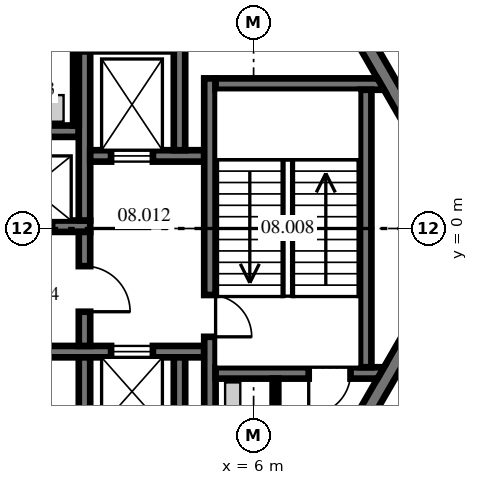
"""IFC4 building model, lengths in metres.
Left out: names, types, materials, properties, quantities, classifications, styles, units other than length and angle.
Written with IfcOpenShell. Run it as: python <this file> out.ifc"""

import sys

from ifc_helpers import new_model, si_unit, direction, frame, frame_2d, origin, place, context, subcontext, project, spatial, polyline, rectangle, outline, extrude, source, transform, mapped, element, fill, save


model = new_model("IFC4")
c1 = context("Model", 3, precision=1e-05, world=origin(), true_north=direction((0.0, 1.0)))
c2 = subcontext(c1, "Body", "Model", "MODEL_VIEW")
j1 = project(units=[si_unit("LENGTHUNIT", "METRE"), si_unit("PLANEANGLEUNIT", "RADIAN")], contexts=[c1])
p1 = place(None, origin())
s1 = spatial("IfcSite", under=j1, at=p1, CompositionType="ELEMENT")
p2 = place(p1, origin())
s2 = spatial("IfcBuilding", under=s1, at=p2, CompositionType="ELEMENT")
p3 = place(p2, frame((0.0, 0.0, 37.5)))
s3 = spatial("IfcBuildingStorey", under=s2, at=p3, CompositionType="ELEMENT", Elevation=37.5)
m1 = source(origin(), c2, "Body", "SweptSolid", [
    extrude(outline(polyline([(-0.115, -0.2), (11.885, -0.2), (11.654, 0.2), (0.115, 0.2), (-0.115, -0.2)])), origin(), (0.0, 0.0, 1.0), 4.1),
])
p4 = place(p3, frame((11.769, 0.0, 0.0), z_axis=(0.0, 0.0, 1.0), x_axis=(-0.499996592174, 0.866027371285, 0.0)))
e1 = element("IfcWall", 1, at=p4, inside=s3, PredefinedType="SHEAR", context=c2, shape_type="MappedRepresentation", body=[
    mapped(m1, transform((0.0, 0.0, 0.0), scale=1.0)),
])
p5 = place(p4, frame((5.75, 0.0, 0.0)))
e2 = element("IfcOpeningElement", 2, at=p5, cuts=e1, PredefinedType="OPENING", context=c2, shape_type="SweptSolid", body=[
    extrude(rectangle(XDim=1.2, YDim=2.1, at=frame_2d((0.6, 1.05))), frame((0.0, 0.21, 0.0), z_axis=(0.0, -1.0, 0.0), x_axis=(1.0, 0.0, 0.0)), (0.0, 0.0, 1.0), 0.42),
])
p6 = place(p3, frame((5.885, -10.192, 0.0), z_axis=(0.0, 0.0, 1.0), x_axis=(0.499996592174, 0.866027371285, 0.0)))
e3 = element("IfcWall", 3, at=p6, inside=s3, PredefinedType="SHEAR", context=c2, shape_type="MappedRepresentation", body=[
    mapped(m1, transform((0.0, 0.0, 0.0), scale=1.0)),
])
p7 = place(p6, frame((3.665, 0.0, 0.0)))
e4 = element("IfcOpeningElement", 4, at=p7, cuts=e3, PredefinedType="OPENING", context=c2, shape_type="SweptSolid", body=[
    extrude(rectangle(XDim=1.2, YDim=2.1, at=frame_2d((0.6, 1.05))), frame((0.0, 0.21, 0.0), z_axis=(0.0, -1.0, 0.0), x_axis=(1.0, 0.0, 0.0)), (0.0, 0.0, 1.0), 0.42),
])
m2 = source(origin(), c2, "Body", "SweptSolid", [
    extrude(rectangle(XDim=11.5, YDim=0.3, at=frame_2d((5.75, 0.0))), origin(), (0.0, 0.0, 1.0), 4.1),
])
p8 = place(p3, frame((-9.8, 0.06, 0.0), z_axis=(0.0, 0.0, 1.0), x_axis=(1.0, 0.0, 0.0)))
e5 = element("IfcWall", 5, at=p8, inside=s3, PredefinedType="SHEAR", context=c2, shape_type="MappedRepresentation", body=[
    mapped(m2, transform((0.0, 0.0, 0.0), scale=1.0)),
])
p9 = place(p8, frame((1.0, 0.0, 0.0)))
e6 = element("IfcOpeningElement", 6, at=p9, cuts=e5, PredefinedType="OPENING", context=c2, shape_type="SweptSolid", body=[
    extrude(rectangle(XDim=1.1, YDim=2.1, at=frame_2d((0.55, 1.05))), frame((0.0, 0.16, 0.0), z_axis=(0.0, -1.0, 0.0), x_axis=(1.0, 0.0, 0.0)), (0.0, 0.0, 1.0), 0.32),
])
p10 = place(p8, frame((3.8, 0.0, 0.0)))
e7 = element("IfcOpeningElement", 7, at=p10, cuts=e5, PredefinedType="OPENING", context=c2, shape_type="SweptSolid", body=[
    extrude(rectangle(XDim=1.1, YDim=2.1, at=frame_2d((0.55, 1.05))), frame((0.0, 0.16, 0.0), z_axis=(0.0, -1.0, 0.0), x_axis=(1.0, 0.0, 0.0)), (0.0, 0.0, 1.0), 0.32),
])
p11 = place(p8, frame((6.6, 0.0, 0.0)))
e8 = element("IfcOpeningElement", 8, at=p11, cuts=e5, PredefinedType="OPENING", context=c2, shape_type="SweptSolid", body=[
    extrude(rectangle(XDim=1.1, YDim=2.1, at=frame_2d((0.55, 1.05))), frame((0.0, 0.16, 0.0), z_axis=(0.0, -1.0, 0.0), x_axis=(1.0, 0.0, 0.0)), (0.0, 0.0, 1.0), 0.32),
])
p12 = place(p8, frame((9.4, 0.0, 0.0)))
e9 = element("IfcOpeningElement", 9, at=p12, cuts=e5, PredefinedType="OPENING", context=c2, shape_type="SweptSolid", body=[
    extrude(rectangle(XDim=1.1, YDim=2.1, at=frame_2d((0.55, 1.05))), frame((0.0, 0.16, 0.0), z_axis=(0.0, -1.0, 0.0), x_axis=(1.0, 0.0, 0.0)), (0.0, 0.0, 1.0), 0.32),
])
m3 = source(origin(), c2, "Body", "SweptSolid", [
    extrude(outline(polyline([(11.2, -0.15), (-0.349, -0.15), (-0.176, 0.15), (11.2, 0.15), (11.2, -0.15)])), origin(), (0.0, 0.0, 1.0), 4.1),
])
p13 = place(p3, frame((-9.8, 2.56, 0.0), z_axis=(0.0, 0.0, 1.0), x_axis=(1.0, 0.0, 0.0)))
e10 = element("IfcWall", 10, at=p13, inside=s3, PredefinedType="SHEAR", context=c2, shape_type="MappedRepresentation", body=[
    mapped(m3, transform((0.0, 0.0, 0.0), scale=1.0)),
])
m4 = source(origin(), c2, "Body", "SweptSolid", [
    extrude(rectangle(XDim=4.45, YDim=0.3, at=frame_2d((2.225, 0.0))), origin(), (0.0, 0.0, 1.0), 4.1),
])
p14 = place(p3, frame((1.55, 0.21, 0.0), z_axis=(0.0, 0.0, 1.0), x_axis=(0.0, 1.0, 0.0)))
e11 = element("IfcWall", 11, at=p14, inside=s3, PredefinedType="SHEAR", context=c2, shape_type="MappedRepresentation", body=[
    mapped(m4, transform((0.0, 0.0, 0.0), scale=1.0)),
])
m5 = source(origin(), c2, "Body", "SweptSolid", [
    extrude(rectangle(XDim=3.0, YDim=0.3, at=frame_2d((1.5, 0.0))), origin(), (0.0, 0.0, 1.0), 4.1),
])
p15 = place(p3, frame((1.7, 1.91, 0.0), z_axis=(0.0, 0.0, 1.0), x_axis=(1.0, 0.0, 0.0)))
e12 = element("IfcWall", 12, at=p15, inside=s3, PredefinedType="SHEAR", context=c2, shape_type="MappedRepresentation", body=[
    mapped(m5, transform((0.0, 0.0, 0.0), scale=1.0)),
])
p16 = place(p15, frame((0.55, 0.0, 0.0)))
e13 = element("IfcOpeningElement", 13, at=p16, cuts=e12, PredefinedType="OPENING", context=c2, shape_type="SweptSolid", body=[
    extrude(rectangle(XDim=1.1, YDim=2.1, at=frame_2d((0.55, 1.05))), frame((0.0, 0.16, 0.0), z_axis=(0.0, -1.0, 0.0), x_axis=(1.0, 0.0, 0.0)), (0.0, 0.0, 1.0), 0.32),
])
m6 = source(origin(), c2, "Body", "SweptSolid", [
    extrude(rectangle(XDim=2.9, YDim=0.3, at=frame_2d((1.45, 0.0))), origin(), (0.0, 0.0, 1.0), 4.1),
])
p17 = place(p3, frame((4.05, 2.06, 0.0), z_axis=(0.0, 0.0, 1.0), x_axis=(0.0, 1.0, 0.0)))
e14 = element("IfcWall", 14, at=p17, inside=s3, PredefinedType="SHEAR", context=c2, shape_type="MappedRepresentation", body=[
    mapped(m6, transform((0.0, 0.0, 0.0), scale=1.0)),
])
m7 = source(origin(), c2, "Body", "SweptSolid", [
    extrude(rectangle(XDim=12.8, YDim=0.3, at=frame_2d((6.4, 0.0))), origin(), (0.0, 0.0, 1.0), 4.1),
])
p18 = place(p3, frame((-8.1, -3.24, 0.0), z_axis=(0.0, 0.0, 1.0), x_axis=(1.0, 0.0, 0.0)))
e15 = element("IfcWall", 15, at=p18, inside=s3, PredefinedType="SHEAR", context=c2, shape_type="MappedRepresentation", body=[
    mapped(m7, transform((0.0, 0.0, 0.0), scale=1.0)),
])
p19 = place(p18, frame((0.913, 0.0, 0.0)))
e16 = element("IfcOpeningElement", 16, at=p19, cuts=e15, PredefinedType="OPENING", context=c2, shape_type="SweptSolid", body=[
    extrude(rectangle(XDim=0.9, YDim=2.1, at=frame_2d((0.45, 1.05))), frame((0.0, 0.16, 0.0), z_axis=(0.0, -1.0, 0.0), x_axis=(1.0, 0.0, 0.0)), (0.0, 0.0, 1.0), 0.32),
])
p20 = place(p18, frame((3.05, 0.0, 0.0)))
e17 = element("IfcOpeningElement", 17, at=p20, cuts=e15, PredefinedType="OPENING", context=c2, shape_type="SweptSolid", body=[
    extrude(rectangle(XDim=0.9, YDim=2.1, at=frame_2d((0.45, 1.05))), frame((0.0, 0.16, 0.0), z_axis=(0.0, -1.0, 0.0), x_axis=(1.0, 0.0, 0.0)), (0.0, 0.0, 1.0), 0.32),
])
p21 = place(p18, frame((6.587, 0.0, 0.0)))
e18 = element("IfcOpeningElement", 18, at=p21, cuts=e15, PredefinedType="OPENING", context=c2, shape_type="SweptSolid", body=[
    extrude(rectangle(XDim=0.9, YDim=2.1, at=frame_2d((0.45, 1.05))), frame((0.0, 0.16, 0.0), z_axis=(0.0, -1.0, 0.0), x_axis=(1.0, 0.0, 0.0)), (0.0, 0.0, 1.0), 0.32),
])
p22 = place(p18, frame((10.35, 0.0, 0.0)))
e19 = element("IfcOpeningElement", 19, at=p22, cuts=e15, PredefinedType="OPENING", context=c2, shape_type="SweptSolid", body=[
    extrude(rectangle(XDim=1.1, YDim=2.1, at=frame_2d((0.55, 1.05))), frame((0.0, 0.16, 0.0), z_axis=(0.0, -1.0, 0.0), x_axis=(1.0, 0.0, 0.0)), (0.0, 0.0, 1.0), 0.32),
])
m8 = source(origin(), c2, "Body", "SweptSolid", [
    extrude(rectangle(XDim=2.2, YDim=0.3, at=frame_2d((1.1, 0.0))), origin(), (0.0, 0.0, 1.0), 4.1),
])
p23 = place(p3, frame((1.55, -5.59, 0.0), z_axis=(0.0, 0.0, 1.0), x_axis=(0.0, 1.0, 0.0)))
e20 = element("IfcWall", 20, at=p23, inside=s3, PredefinedType="SHEAR", context=c2, shape_type="MappedRepresentation", body=[
    mapped(m8, transform((0.0, 0.0, 0.0), scale=1.0)),
])
m9 = source(origin(), c2, "Body", "SweptSolid", [
    extrude(rectangle(XDim=2.5, YDim=0.3, at=frame_2d((1.25, 0.0))), origin(), (0.0, 0.0, 1.0), 4.1),
])
p24 = place(p3, frame((4.05, -5.89, 0.0), z_axis=(0.0, 0.0, 1.0), x_axis=(0.0, 1.0, 0.0)))
e21 = element("IfcWall", 21, at=p24, inside=s3, PredefinedType="SHEAR", context=c2, shape_type="MappedRepresentation", body=[
    mapped(m9, transform((0.0, 0.0, 0.0), scale=1.0)),
])
p25 = place(p3, frame((1.55, -3.09, 0.0), z_axis=(0.0, 0.0, 1.0), x_axis=(0.0, 1.0, 0.0)))
e22 = element("IfcWall", 22, at=p25, inside=s3, PredefinedType="SHEAR", context=c2, shape_type="MappedRepresentation", body=[
    mapped(m5, transform((0.0, 0.0, 0.0), scale=1.0)),
])
p26 = place(p25, frame((0.9, 0.0, 0.0)))
e23 = element("IfcOpeningElement", 23, at=p26, cuts=e22, PredefinedType="OPENING", context=c2, shape_type="SweptSolid", body=[
    extrude(rectangle(XDim=1.2, YDim=2.1, at=frame_2d((0.6, 1.05))), frame((0.0, 0.16, 0.0), z_axis=(0.0, -1.0, 0.0), x_axis=(1.0, 0.0, 0.0)), (0.0, 0.0, 1.0), 0.32),
])
m10 = source(origin(), c2, "Body", "SweptSolid", [
    extrude(outline(polyline([(-0.15, -0.15), (9.99, -0.15), (9.99, 0.15), (0.15, 0.15), (-0.15, -0.15)])), origin(), (0.0, 0.0, 1.0), 4.1),
])
p27 = place(p3, frame((4.85, -6.04, 0.0), z_axis=(0.0, 0.0, 1.0), x_axis=(0.0, 1.0, 0.0)))
e24 = element("IfcWall", 24, at=p27, inside=s3, PredefinedType="SHEAR", context=c2, shape_type="MappedRepresentation", body=[
    mapped(m10, transform((0.0, 0.0, 0.0), scale=1.0)),
])
p28 = place(p27, frame((3.19, 0.0, 0.0)))
e25 = element("IfcOpeningElement", 25, at=p28, cuts=e24, PredefinedType="OPENING", context=c2, shape_type="SweptSolid", body=[
    extrude(rectangle(XDim=1.1, YDim=2.1, at=frame_2d((0.55, 1.05))), frame((0.0, 0.16, 0.0), z_axis=(0.0, -1.0, 0.0), x_axis=(1.0, 0.0, 0.0)), (0.0, 0.0, 1.0), 0.32),
])
m11 = source(origin(), c2, "Body", "SweptSolid", [
    extrude(outline(polyline([(0.0, -0.15), (0.0, 0.15), (4.26, 0.15), (4.433, -0.15), (0.0, -0.15)])), origin(), (0.0, 0.0, 1.0), 4.1),
])
p29 = place(p3, frame((5.0, 3.8, 0.0), z_axis=(0.0, 0.0, 1.0), x_axis=(1.0, 0.0, 0.0)))
e26 = element("IfcWall", 26, at=p29, inside=s3, PredefinedType="SHEAR", context=c2, shape_type="MappedRepresentation", body=[
    mapped(m11, transform((0.0, 0.0, 0.0), scale=1.0)),
])
m12 = source(origin(), c2, "Body", "SweptSolid", [
    extrude(outline(polyline([(0.0, -0.15), (0.0, 0.15), (4.433, 0.15), (4.26, -0.15), (0.0, -0.15)])), origin(), (0.0, 0.0, 1.0), 4.1),
])
p30 = place(p3, frame((5.0, -3.8, 0.0), z_axis=(0.0, 0.0, 1.0), x_axis=(1.0, 0.0, 0.0)))
e27 = element("IfcWall", 27, at=p30, inside=s3, PredefinedType="SHEAR", context=c2, shape_type="MappedRepresentation", body=[
    mapped(m12, transform((0.0, 0.0, 0.0), scale=1.0)),
])
p31 = place(p30, frame((2.45, 0.0, 0.0)))
e28 = element("IfcOpeningElement", 28, at=p31, cuts=e27, PredefinedType="OPENING", context=c2, shape_type="SweptSolid", body=[
    extrude(rectangle(XDim=1.1, YDim=2.1, at=frame_2d((0.55, 1.05))), frame((0.0, 0.16, 0.0), z_axis=(0.0, -1.0, 0.0), x_axis=(1.0, 0.0, 0.0)), (0.0, 0.0, 1.0), 0.32),
])
m13 = source(origin(), c2, "Body", "SweptSolid", [
    extrude(rectangle(XDim=7.3, YDim=0.3, at=frame_2d((3.65, 0.0))), origin(), (0.0, 0.0, 1.0), 4.1),
])
p32 = place(p3, frame((8.95, -3.65, 0.0), z_axis=(0.0, 0.0, 1.0), x_axis=(0.0, 1.0, 0.0)))
e29 = element("IfcWall", 29, at=p32, inside=s3, PredefinedType="SHEAR", context=c2, shape_type="MappedRepresentation", body=[
    mapped(m13, transform((0.0, 0.0, 0.0), scale=1.0)),
])
m14 = source(origin(), c2, "Body", "SweptSolid", [
    extrude(rectangle(XDim=3.18, YDim=0.15, at=frame_2d((1.59, 0.0))), origin(), (0.0, 0.0, 1.0), 4.1),
])
p33 = place(p3, frame((1.325, 2.71, 0.0), z_axis=(0.0, 0.0, 1.0), x_axis=(0.0, 1.0, 0.0)))
e30 = element("IfcWall", 30, at=p33, inside=s3, PredefinedType="PARTITIONING", context=c2, shape_type="MappedRepresentation", body=[
    mapped(m14, transform((0.0, 0.0, 0.0), scale=1.0)),
])
p34 = place(p33, frame((2.265, 0.0, 0.0)))
e31 = element("IfcOpeningElement", 31, at=p34, cuts=e30, PredefinedType="OPENING", context=c2, shape_type="SweptSolid", body=[
    extrude(rectangle(XDim=0.9, YDim=2.1, at=frame_2d((0.45, 1.05))), frame((0.0, 0.085, 0.0), z_axis=(0.0, -1.0, 0.0), x_axis=(1.0, 0.0, 0.0)), (0.0, 0.0, 1.0), 0.17),
])
m15 = source(origin(), c2, "Body", "SweptSolid", [
    extrude(outline(polyline([(-0.075, -0.075), (2.24, -0.075), (2.24, 0.075), (0.075, 0.075), (-0.075, -0.075)])), origin(), (0.0, 0.0, 1.0), 4.1),
])
p35 = place(p3, frame((6.575, -6.19, 0.0), z_axis=(0.0, 0.0, 1.0), x_axis=(0.0, 1.0, 0.0)))
e32 = element("IfcWall", 32, at=p35, inside=s3, PredefinedType="PARTITIONING", context=c2, shape_type="MappedRepresentation", body=[
    mapped(m15, transform((0.0, 0.0, 0.0), scale=1.0)),
])
p36 = place(p3, frame((7.623, 13.082, 0.0), z_axis=(0.0, 0.0, 1.0), x_axis=(0.499985944963, -0.866033518312, 0.0)))
e33 = element("IfcWall", 33, at=p36, inside=s3, PredefinedType="PARTITIONING", context=c2, shape_type="SweptSolid", body=[
    extrude(rectangle(XDim=15.105, YDim=0.2, at=frame_2d((7.553, 0.0))), origin(), (0.0, 0.0, 1.0), 4.1),
])
p37 = place(p36, frame((9.455, 0.0, 0.0)))
e34 = element("IfcOpeningElement", 34, at=p37, cuts=e33, PredefinedType="OPENING", context=c2, shape_type="SweptSolid", body=[
    extrude(rectangle(XDim=1.0, YDim=2.1, at=frame_2d((0.5, 1.05))), frame((0.0, 0.11, 0.0), z_axis=(0.0, -1.0, 0.0), x_axis=(1.0, 0.0, 0.0)), (0.0, 0.0, 1.0), 0.22),
])
p38 = place(p28, frame((1.1, 0.0, 0.0), z_axis=(0.0, 0.0, 1.0), x_axis=(-1.0, 0.0, 0.0)))
e35 = element("IfcDoor", 35, at=p38, inside=s3, OperationType="SINGLE_SWING_RIGHT", PredefinedType="DOOR", context=c2, shape_type="SweptSolid", body=[
    extrude(rectangle(XDim=1.1, YDim=2.1, at=frame_2d((0.55, 1.05))), frame((0.0, 0.025, 0.0), z_axis=(0.0, -1.0, 0.0), x_axis=(1.0, 0.0, 0.0)), (0.0, 0.0, 1.0), 0.05),
])
fill(e25, e35)
p39 = place(p31, frame((1.1, 0.0, 0.0), z_axis=(0.0, 0.0, 1.0), x_axis=(-1.0, 0.0, 0.0)))
e36 = element("IfcDoor", 36, at=p39, inside=s3, OperationType="SINGLE_SWING_RIGHT", PredefinedType="DOOR", context=c2, shape_type="SweptSolid", body=[
    extrude(rectangle(XDim=1.1, YDim=2.1, at=frame_2d((0.55, 1.05))), frame((0.0, 0.025, 0.0), z_axis=(0.0, -1.0, 0.0), x_axis=(1.0, 0.0, 0.0)), (0.0, 0.0, 1.0), 0.05),
])
fill(e28, e36)
p40 = place(p26, frame((1.2, 0.0, 0.0), z_axis=(0.0, 0.0, 1.0), x_axis=(-1.0, 0.0, 0.0)))
e37 = element("IfcDoor", 37, at=p40, inside=s3, OperationType="SINGLE_SWING_RIGHT", PredefinedType="DOOR", context=c2, shape_type="SweptSolid", body=[
    extrude(rectangle(XDim=1.2, YDim=2.1, at=frame_2d((0.6, 1.05))), frame((0.0, 0.025, 0.0), z_axis=(0.0, -1.0, 0.0), x_axis=(1.0, 0.0, 0.0)), (0.0, 0.0, 1.0), 0.05),
])
fill(e23, e37)
p41 = place(p16, origin())
e38 = element("IfcDoor", 38, at=p41, inside=s3, OperationType="DOUBLE_DOOR_SLIDING", PredefinedType="DOOR", context=c2, shape_type="SweptSolid", body=[
    extrude(rectangle(XDim=1.1, YDim=2.1, at=frame_2d((0.55, 1.05))), frame((0.0, 0.025, 0.0), z_axis=(0.0, -1.0, 0.0), x_axis=(1.0, 0.0, 0.0)), (0.0, 0.0, 1.0), 0.05),
])
fill(e13, e38)
p42 = place(p22, origin())
e39 = element("IfcDoor", 39, at=p42, inside=s3, OperationType="DOUBLE_DOOR_SLIDING", PredefinedType="DOOR", context=c2, shape_type="SweptSolid", body=[
    extrude(rectangle(XDim=1.1, YDim=2.1, at=frame_2d((0.55, 1.05))), frame((0.0, 0.025, 0.0), z_axis=(0.0, -1.0, 0.0), x_axis=(1.0, 0.0, 0.0)), (0.0, 0.0, 1.0), 0.05),
])
fill(e19, e39)
save(model, sys.argv[1])
